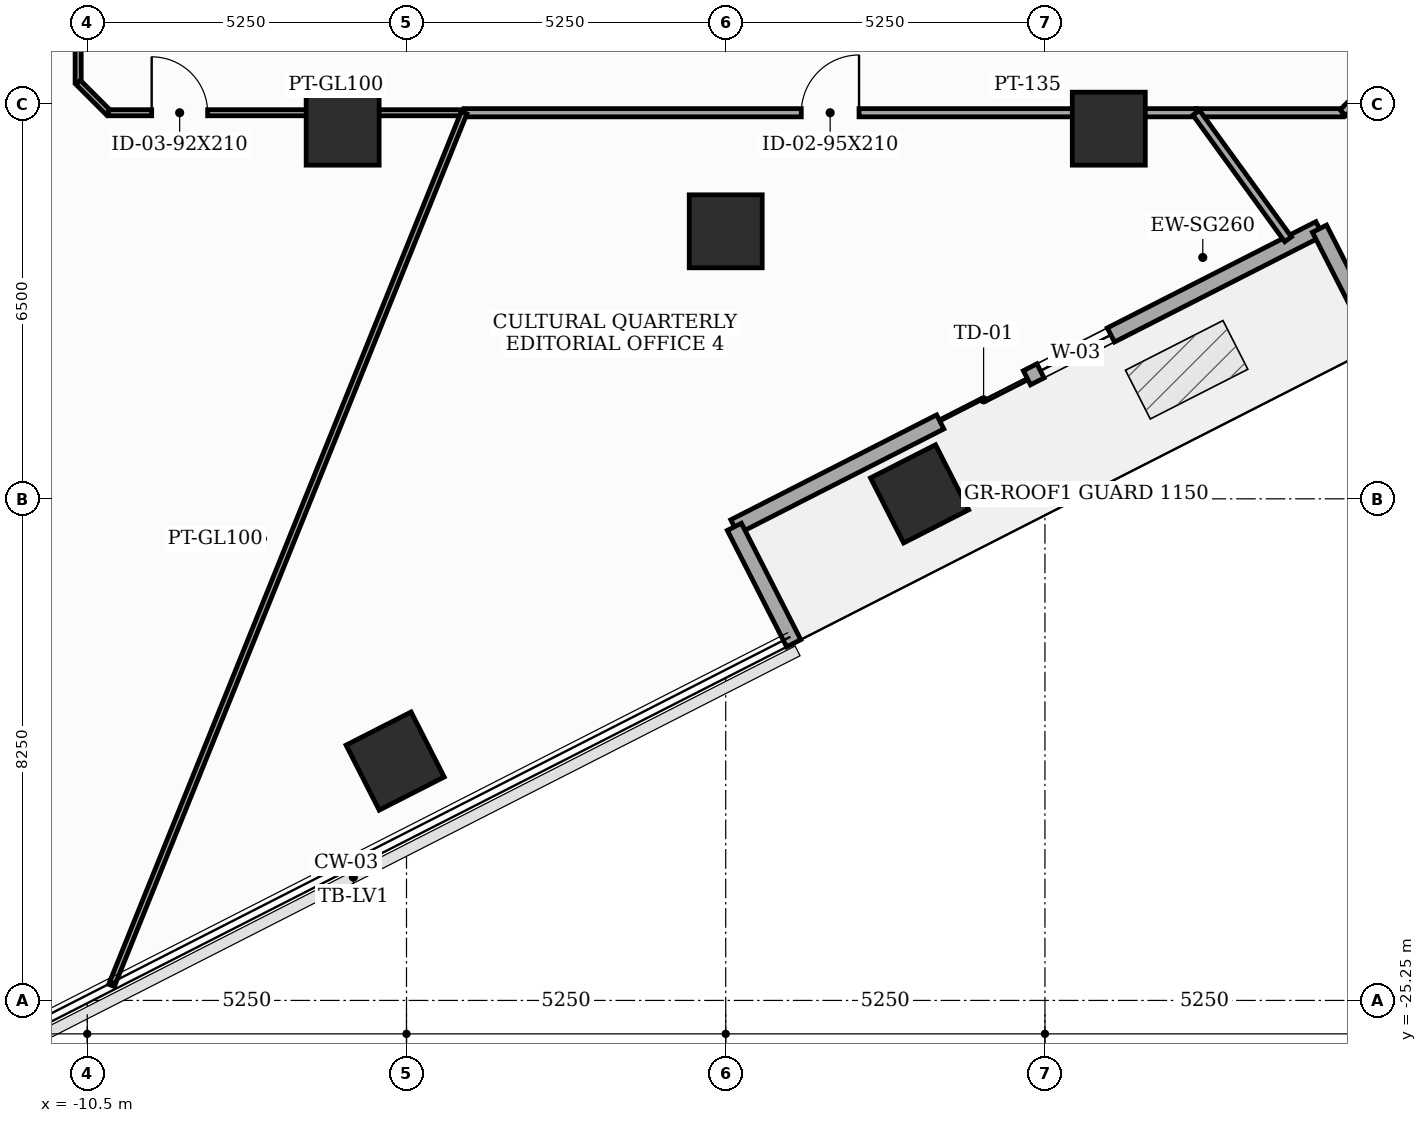
"""IFC4 building model, lengths in metres.
Left out: names, types, materials, properties, quantities, classifications, styles, units other than length and angle.
Written with IfcOpenShell. Run it as: python <this file> out.ifc"""

import sys

from ifc_helpers import new_model, si_unit, direction, frame, frame_2d, origin, origin_2d, place, context, subcontext, project, spatial, rectangle, extrude, element, fill, save


model = new_model("IFC4")
c1 = context("Model", 3, precision=1e-05, world=origin(), true_north=direction((0.0, 1.0)))
c2 = subcontext(c1, "Body", "Model", "MODEL_VIEW")
j1 = project(units=[si_unit("LENGTHUNIT", "METRE"), si_unit("PLANEANGLEUNIT", "RADIAN")], contexts=[c1])
p1 = place(None, origin())
s1 = spatial("IfcSite", under=j1, at=p1, CompositionType="ELEMENT")
p2 = place(p1, origin())
s2 = spatial("IfcBuilding", under=s1, at=p2, CompositionType="ELEMENT")
p3 = place(p2, frame((0.0, 0.0, 131.0)))
s3 = spatial("IfcBuildingStorey", under=s2, at=p3, CompositionType="ELEMENT", Elevation=131.0)
for number, where, z_axis, x_axis in (
    (1, (-6.3, -10.912, 0.0), (0.0, 0.0, 1.0), (1.0, 0.0, 0.0)),
    (2, (0.0, -12.6, 0.0), (0.0, 0.0, 1.0), (1.0, 0.0, 0.0)),
    (3, (6.3, -10.912, 0.0), (0.0, 0.0, 1.0), (1.0, 0.0, 0.0)),
    (4, (-5.437, -21.313, 0.0), (0.0, 0.0, 1.0), (0.891, 0.454, 0.0)),
    (5, (3.188, -16.918, 0.0), (0.0, 0.0, 1.0), (0.891, 0.454, 0.0)),
):
    element("IfcColumn", number, at=place(p3, frame(where, z_axis=z_axis, x_axis=x_axis)), inside=s3, PredefinedType="COLUMN", context=c2, shape_type="SweptSolid", body=[
        extrude(rectangle(XDim=1.2, YDim=1.2, at=origin_2d()), origin(), (0.0, 0.0, 1.0), 3.7),
    ])
p4 = place(p3, frame((0.142, -17.46, 0.0), z_axis=(0.0, 0.0, 1.0), x_axis=(0.891006026667, 0.453991476178, 0.0)))
e6 = element("IfcWall", 6, at=p4, inside=s3, PredefinedType="SOLIDWALL", context=c2, shape_type="SweptSolid", body=[
    extrude(rectangle(XDim=10.8, YDim=0.26, at=frame_2d((5.4, 0.0))), origin(), (0.0, 0.0, 1.0), 3.5),
])
p5 = place(p4, frame((3.8, 0.0, 0.0)))
e7 = element("IfcOpeningElement", 7, at=p5, cuts=e6, PredefinedType="OPENING", context=c2, shape_type="SweptSolid", body=[
    extrude(rectangle(XDim=1.6, YDim=2.08, at=frame_2d((0.8, 1.04))), frame((0.0, 0.14, 0.0), z_axis=(0.0, -1.0, 0.0), x_axis=(1.0, 0.0, 0.0)), (0.0, 0.0, 1.0), 0.28),
])
p6 = place(p4, frame((5.65, 0.0, 0.85)))
e8 = element("IfcOpeningElement", 8, at=p6, cuts=e6, PredefinedType="OPENING", context=c2, shape_type="SweptSolid", body=[
    extrude(rectangle(XDim=1.3, YDim=1.25, at=frame_2d((0.65, 0.625))), frame((0.0, 0.14, 0.0), z_axis=(0.0, -1.0, 0.0), x_axis=(1.0, 0.0, 0.0)), (0.0, 0.0, 1.0), 0.28),
])
for number, where, z_axis, x_axis in (
    (9, (1.118, -19.376, 0.0), (0.0, 0.0, 1.0), (-0.454, 0.891, 0.0)),
    (10, (9.765, -12.557, 0.0), (0.0, 0.0, 1.0), (0.454, -0.891, 0.0)),
):
    element("IfcWall", number, at=place(p3, frame(where, z_axis=z_axis, x_axis=x_axis)), inside=s3, PredefinedType="SOLIDWALL", context=c2, shape_type="SweptSolid", body=[
        extrude(rectangle(XDim=2.15, YDim=0.26, at=frame_2d((1.075, 0.0))), origin(), (0.0, 0.0, 1.0), 3.5),
    ])
p7 = place(p3, frame((-10.65, -6.655, 0.0), z_axis=(0.0, 0.0, 1.0), x_axis=(0.0, -1.0, 0.0)))
e11 = element("IfcWall", 11, at=p7, inside=s3, PredefinedType="MOVABLE", context=c2, shape_type="SweptSolid", body=[
    extrude(rectangle(XDim=3.495, YDim=0.1, at=frame_2d((1.748, 0.0))), origin(), (0.0, 0.0, 1.0), 2.785),
])
p8 = place(p3, frame((-10.65, -10.15, 0.0), z_axis=(0.0, 0.0, 1.0), x_axis=(0.707106781187, -0.707106781187, 0.0)))
e12 = element("IfcWall", 12, at=p8, inside=s3, PredefinedType="MOVABLE", context=c2, shape_type="SweptSolid", body=[
    extrude(rectangle(XDim=0.707, YDim=0.1, at=frame_2d((0.354, 0.0))), origin(), (0.0, 0.0, 1.0), 3.5),
])
p9 = place(p3, frame((-10.15, -10.65, 0.0), z_axis=(0.0, 0.0, 1.0), x_axis=(1.0, 0.0, 0.0)))
e13 = element("IfcWall", 13, at=p9, inside=s3, PredefinedType="MOVABLE", context=c2, shape_type="SweptSolid", body=[
    extrude(rectangle(XDim=5.847, YDim=0.1, at=frame_2d((2.923, 0.0))), origin(), (0.0, 0.0, 1.0), 2.785),
])
p10 = place(p9, frame((0.709, 0.0, 0.0)))
e14 = element("IfcOpeningElement", 14, at=p10, cuts=e13, PredefinedType="OPENING", context=c2, shape_type="SweptSolid", body=[
    extrude(rectangle(XDim=0.92, YDim=2.1, at=frame_2d((0.46, 1.05))), frame((0.0, 0.06, 0.0), z_axis=(0.0, -1.0, 0.0), x_axis=(1.0, 0.0, 0.0)), (0.0, 0.0, 1.0), 0.12),
])
p11 = place(p3, frame((-4.303, -10.65, 0.0), z_axis=(0.0, 0.0, 1.0), x_axis=(1.0, 0.0, 0.0)))
e15 = element("IfcWall", 15, at=p11, inside=s3, PredefinedType="PARTITIONING", context=c2, shape_type="SweptSolid", body=[
    extrude(rectangle(XDim=12.041, YDim=0.135, at=frame_2d((6.021, 0.0))), origin(), (0.0, 0.0, 1.0), 2.785),
])
p12 = place(p11, frame((5.545, 0.0, 0.0)))
e16 = element("IfcOpeningElement", 16, at=p12, cuts=e15, PredefinedType="OPENING", context=c2, shape_type="SweptSolid", body=[
    extrude(rectangle(XDim=0.95, YDim=2.1, at=frame_2d((0.475, 1.05))), frame((0.0, 0.077, 0.0), z_axis=(0.0, -1.0, 0.0), x_axis=(1.0, 0.0, 0.0)), (0.0, 0.0, 1.0), 0.155),
])
p13 = place(p3, frame((7.738, -10.65, 0.0), z_axis=(0.0, 0.0, 1.0), x_axis=(1.0, 0.0, 0.0)))
e17 = element("IfcWall", 17, at=p13, inside=s3, PredefinedType="PARTITIONING", context=c2, shape_type="SweptSolid", body=[
    extrude(rectangle(XDim=2.412, YDim=0.135, at=frame_2d((1.206, 0.0))), origin(), (0.0, 0.0, 1.0), 3.5),
])
p14 = place(p3, frame((10.15, -10.65, 0.0), z_axis=(0.0, 0.0, 1.0), x_axis=(0.707106781187, 0.707106781187, 0.0)))
e18 = element("IfcWall", 18, at=p14, inside=s3, PredefinedType="PARTITIONING", context=c2, shape_type="SweptSolid", body=[
    extrude(rectangle(XDim=0.707, YDim=0.135, at=frame_2d((0.354, 0.0))), origin(), (0.0, 0.0, 1.0), 3.5),
])
p15 = place(p3, frame((-10.102, -25.003, 0.0), z_axis=(0.0, 0.0, 1.0), x_axis=(0.374591600556, 0.927189911935, 0.0)))
e19 = element("IfcWall", 19, at=p15, inside=s3, PredefinedType="MOVABLE", context=c2, shape_type="SweptSolid", body=[
    extrude(rectangle(XDim=15.48, YDim=0.1, at=frame_2d((7.74, 0.0))), origin(), (0.0, 0.0, 1.0), 2.785),
])
p16 = place(p3, frame((9.249, -12.731, 0.0), z_axis=(0.0, 0.0, 1.0), x_axis=(-0.587516644322, 0.809212081376, 0.0)))
e20 = element("IfcWall", 20, at=p16, inside=s3, PredefinedType="PARTITIONING", context=c2, shape_type="SweptSolid", body=[
    extrude(rectangle(XDim=2.571, YDim=0.135, at=frame_2d((1.286, 0.0))), origin(), (0.0, 0.0, 1.0), 2.885),
])
p17 = place(p5, frame((1.6, 0.0, 0.0), z_axis=(0.0, 0.0, 1.0), x_axis=(-1.0, 0.0, 0.0)))
e21 = element("IfcDoor", 21, at=p17, inside=s3, OperationType="DOUBLE_DOOR_SLIDING", PredefinedType="DOOR", context=c2, shape_type="SweptSolid", body=[
    extrude(rectangle(XDim=1.6, YDim=2.08, at=frame_2d((0.8, 1.04))), frame((0.0, 0.025, 0.0), z_axis=(0.0, -1.0, 0.0), x_axis=(1.0, 0.0, 0.0)), (0.0, 0.0, 1.0), 0.05),
])
fill(e7, e21)
p18 = place(p6, origin())
e22 = element("IfcWindow", 22, at=p18, inside=s3, PartitioningType="SINGLE_PANEL", PredefinedType="WINDOW", context=c2, shape_type="SweptSolid", body=[
    extrude(rectangle(XDim=1.3, YDim=1.25, at=frame_2d((0.65, 0.625))), frame((0.0, 0.03, 0.0), z_axis=(0.0, -1.0, 0.0), x_axis=(1.0, 0.0, 0.0)), (0.0, 0.0, 1.0), 0.06),
])
fill(e8, e22)
p19 = place(p10, origin())
e23 = element("IfcDoor", 23, at=p19, inside=s3, OperationType="SINGLE_SWING_LEFT", PredefinedType="DOOR", context=c2, shape_type="SweptSolid", body=[
    extrude(rectangle(XDim=0.92, YDim=2.1, at=frame_2d((0.46, 1.05))), frame((0.0, 0.025, 0.0), z_axis=(0.0, -1.0, 0.0), x_axis=(1.0, 0.0, 0.0)), (0.0, 0.0, 1.0), 0.05),
])
fill(e14, e23)
p20 = place(p12, origin())
e24 = element("IfcDoor", 24, at=p20, inside=s3, OperationType="SINGLE_SWING_RIGHT", PredefinedType="DOOR", context=c2, shape_type="SweptSolid", body=[
    extrude(rectangle(XDim=0.95, YDim=2.1, at=frame_2d((0.475, 1.05))), frame((0.0, 0.025, 0.0), z_axis=(0.0, -1.0, 0.0), x_axis=(1.0, 0.0, 0.0)), (0.0, 0.0, 1.0), 0.05),
])
fill(e16, e24)
save(model, sys.argv[1])
